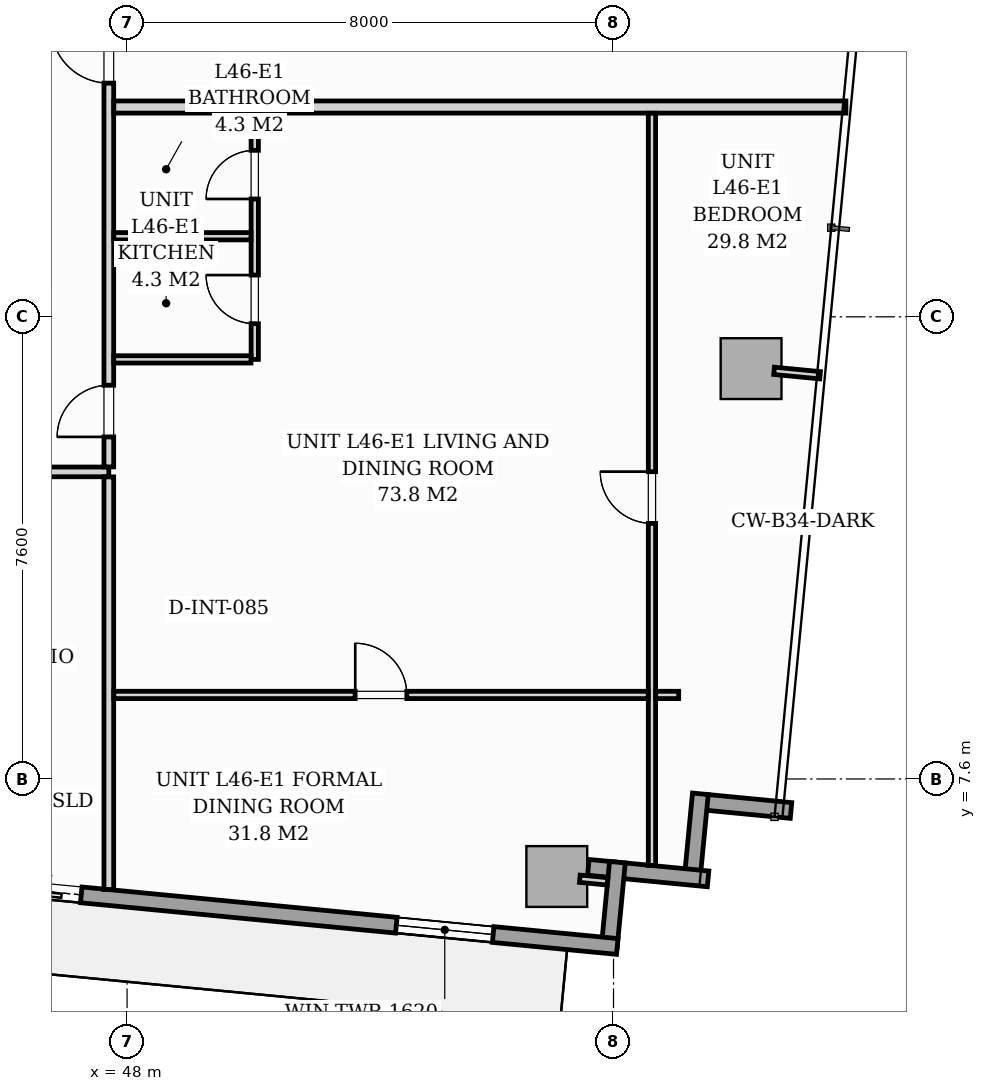
"""IFC4 building model, lengths in metres.
Left out: names, types, materials, properties, quantities, classifications, styles, units other than length and angle.
Written with IfcOpenShell. Run it as: python <this file> out.ifc"""

import sys

from ifc_helpers import new_model, si_unit, direction, frame, frame_2d, origin, origin_2d, place, context, subcontext, project, spatial, rectangle, extrude, source, transform, mapped, element, fill, save


model = new_model("IFC4")
c1 = context("Model", 3, precision=1e-05, world=origin(), true_north=direction((0.0, 1.0)))
c2 = subcontext(c1, "Body", "Model", "MODEL_VIEW")
j1 = project(units=[si_unit("LENGTHUNIT", "METRE"), si_unit("PLANEANGLEUNIT", "RADIAN")], contexts=[c1])
p1 = place(None, origin())
s1 = spatial("IfcSite", under=j1, at=p1, CompositionType="ELEMENT")
p2 = place(p1, origin())
s2 = spatial("IfcBuilding", under=s1, at=p2, CompositionType="ELEMENT")
p3 = place(p2, frame((0.0, 0.0, 159.8)))
s3 = spatial("IfcBuildingStorey", under=s2, at=p3, CompositionType="ELEMENT", Elevation=159.8)
m1 = source(origin(), c2, "Body", "SweptSolid", [
    extrude(rectangle(XDim=1.0, YDim=1.0, at=origin_2d()), origin(), (0.0, 0.0, 1.0), 3.194),
])
for number, where, z_axis, x_axis in (
    (1, (55.067, 5.996, 0.002), (0.0, 0.0, 1.0), (0.995, -0.096, 0.0)),
    (2, (58.262, 14.348, 0.002), (0.0, 0.0, 1.0), (0.995, -0.096, 0.0)),
):
    element("IfcColumn", number, at=place(p3, frame(where, z_axis=z_axis, x_axis=x_axis)), inside=s3, PredefinedType="COLUMN", context=c2, shape_type="MappedRepresentation", body=[
        mapped(m1, transform((0.0, 0.0, 0.0), scale=1.0)),
    ])
for number, where, z_axis, x_axis in (
    (3, (58.919, 7.082, 0.0), (0.0, 0.0, 1.0), (-0.995, 0.096, 0.0)),
    (4, (57.428, 7.356, 0.0), (0.0, 0.0, 1.0), (-0.096, -0.995, 0.0)),
):
    element("IfcWall", number, at=place(p3, frame(where, z_axis=z_axis, x_axis=x_axis)), inside=s3, PredefinedType="STANDARD", context=c2, shape_type="SweptSolid", body=[
        extrude(rectangle(XDim=1.395, YDim=0.26, at=frame_2d((0.697, 0.0))), origin(), (0.0, 0.0, 1.0), 2.9),
    ])
p4 = place(p3, frame((57.555, 5.958, 0.0), z_axis=(0.0, 0.0, 1.0), x_axis=(-0.995401789159, 0.095787672171, 0.0)))
e5 = element("IfcWall", 5, at=p4, inside=s3, PredefinedType="STANDARD", context=c2, shape_type="SweptSolid", body=[
    extrude(rectangle(XDim=1.978, YDim=0.26, at=frame_2d((0.989, 0.0))), origin(), (0.0, 0.0, 1.0), 2.9),
])
p5 = place(p3, frame((56.064, 6.232, 0.0), z_axis=(0.0, 0.0, 1.0), x_axis=(-0.09589913835, -0.995391056452, 0.0)))
e6 = element("IfcWall", 6, at=p5, inside=s3, PredefinedType="STANDARD", context=c2, shape_type="SweptSolid", body=[
    extrude(rectangle(XDim=1.395, YDim=0.26, at=frame_2d((0.698, 0.0))), origin(), (0.0, 0.0, 1.0), 2.9),
])
p6 = place(p3, frame((56.061, 4.845, 0.0), z_axis=(0.0, 0.0, 1.0), x_axis=(-0.995395976631, 0.095848055311, 0.0)))
e7 = element("IfcWall", 7, at=p6, inside=s3, PredefinedType="STANDARD", context=c2, shape_type="SweptSolid", body=[
    extrude(rectangle(XDim=17.01, YDim=0.26, at=frame_2d((8.505, 0.0))), origin(), (0.0, 0.0, 1.0), 2.9),
])
p7 = place(p6, frame((8.856, 0.0, 0.0)))
e8 = element("IfcOpeningElement", 8, at=p7, cuts=e7, PredefinedType="OPENING", context=c2, shape_type="SweptSolid", body=[
    extrude(rectangle(XDim=1.8, YDim=2.06, at=frame_2d((0.9, 1.03))), frame((0.0, 0.14, 0.0), z_axis=(0.0, -1.0, 0.0), x_axis=(1.0, 0.0, 0.0)), (0.0, 0.0, 1.0), 0.28),
])
p8 = place(p6, frame((2.05, 0.0, 0.65)))
e9 = element("IfcOpeningElement", 9, at=p8, cuts=e7, PredefinedType="OPENING", context=c2, shape_type="SweptSolid", body=[
    extrude(rectangle(XDim=1.6, YDim=1.5, at=frame_2d((0.8, 0.75))), frame((0.0, 0.14, 0.0), z_axis=(0.0, -1.0, 0.0), x_axis=(1.0, 0.0, 0.0)), (0.0, 0.0, 1.0), 0.28),
])
p9 = place(p3, frame((22.05, 12.65, 0.0), z_axis=(0.0, 0.0, 1.0), x_axis=(1.0, 0.0, 0.0)))
e10 = element("IfcWall", 10, at=p9, inside=s3, PredefinedType="PARTITIONING", context=c2, shape_type="SweptSolid", body=[
    extrude(rectangle(XDim=25.65, YDim=0.16, at=frame_2d((12.825, 0.0))), origin(), (0.0, 0.0, 1.0), 2.9),
])
p10 = place(p9, frame((1.736, 0.0, 0.0)))
e11 = element("IfcOpeningElement", 11, at=p10, cuts=e10, PredefinedType="OPENING", context=c2, shape_type="SweptSolid", body=[
    extrude(rectangle(XDim=0.95, YDim=2.06, at=frame_2d((0.475, 1.03))), frame((0.0, 0.09, 0.0), z_axis=(0.0, -1.0, 0.0), x_axis=(1.0, 0.0, 0.0)), (0.0, 0.0, 1.0), 0.18),
])
p11 = place(p9, frame((10.3, 0.0, 0.0)))
e12 = element("IfcOpeningElement", 12, at=p11, cuts=e10, PredefinedType="OPENING", context=c2, shape_type="SweptSolid", body=[
    extrude(rectangle(XDim=0.95, YDim=2.06, at=frame_2d((0.475, 1.03))), frame((0.0, 0.09, 0.0), z_axis=(0.0, -1.0, 0.0), x_axis=(1.0, 0.0, 0.0)), (0.0, 0.0, 1.0), 0.18),
])
p12 = place(p9, frame((22.965, 0.0, 0.0)))
e13 = element("IfcOpeningElement", 13, at=p12, cuts=e10, PredefinedType="OPENING", context=c2, shape_type="SweptSolid", body=[
    extrude(rectangle(XDim=0.95, YDim=2.06, at=frame_2d((0.475, 1.03))), frame((0.0, 0.09, 0.0), z_axis=(0.0, -1.0, 0.0), x_axis=(1.0, 0.0, 0.0)), (0.0, 0.0, 1.0), 0.18),
])
p13 = place(p3, frame((47.7, 5.783, 0.0), z_axis=(0.0, 0.0, 1.0), x_axis=(0.0, 1.0, 0.0)))
e14 = element("IfcWall", 14, at=p13, inside=s3, PredefinedType="PARTITIONING", context=c2, shape_type="SweptSolid", body=[
    extrude(rectangle(XDim=6.785, YDim=0.16, at=frame_2d((3.393, 0.0))), origin(), (0.0, 0.0, 1.0), 2.9),
])
p14 = place(p3, frame((47.7, 12.732, 0.0), z_axis=(0.0, 0.0, 1.0), x_axis=(0.0, 1.0, 0.0)))
e15 = element("IfcWall", 15, at=p14, inside=s3, PredefinedType="PARTITIONING", context=c2, shape_type="SweptSolid", body=[
    extrude(rectangle(XDim=7.918, YDim=0.16, at=frame_2d((3.959, 0.0))), origin(), (0.0, 0.0, 1.0), 2.9),
])
p15 = place(p14, frame((0.493, 0.0, 0.0)))
e16 = element("IfcOpeningElement", 16, at=p15, cuts=e15, PredefinedType="OPENING", context=c2, shape_type="SweptSolid", body=[
    extrude(rectangle(XDim=0.85, YDim=2.0, at=frame_2d((0.425, 1.0))), frame((0.0, 0.09, 0.0), z_axis=(0.0, -1.0, 0.0), x_axis=(1.0, 0.0, 0.0)), (0.0, 0.0, 1.0), 0.18),
])
p16 = place(p14, frame((6.311, 0.0, 0.0)))
e17 = element("IfcOpeningElement", 17, at=p16, cuts=e15, PredefinedType="OPENING", context=c2, shape_type="SweptSolid", body=[
    extrude(rectangle(XDim=0.95, YDim=2.06, at=frame_2d((0.475, 1.03))), frame((0.0, 0.09, 0.0), z_axis=(0.0, -1.0, 0.0), x_axis=(1.0, 0.0, 0.0)), (0.0, 0.0, 1.0), 0.18),
])
p17 = place(p3, frame((47.782, 18.65, 0.0), z_axis=(0.0, 0.0, 1.0), x_axis=(1.0, 0.0, 0.0)))
e18 = element("IfcWall", 18, at=p17, inside=s3, PredefinedType="PARTITIONING", context=c2, shape_type="SweptSolid", body=[
    extrude(rectangle(XDim=12.04, YDim=0.2, at=frame_2d((6.02, 0.0))), origin(), (0.0, 0.0, 1.0), 2.9),
])
p18 = place(p3, frame((50.1, 14.5, 0.0), z_axis=(0.0, 0.0, 1.0), x_axis=(0.0, 1.0, 0.0)))
e19 = element("IfcWall", 19, at=p18, inside=s3, PredefinedType="PARTITIONING", context=c2, shape_type="SweptSolid", body=[
    extrude(rectangle(XDim=4.048, YDim=0.12, at=frame_2d((2.024, 0.0))), origin(), (0.0, 0.0, 1.0), 2.9),
])
p19 = place(p18, frame((0.587, 0.0, 0.0)))
e20 = element("IfcOpeningElement", 20, at=p19, cuts=e19, PredefinedType="OPENING", context=c2, shape_type="SweptSolid", body=[
    extrude(rectangle(XDim=0.8, YDim=2.0, at=frame_2d((0.4, 1.0))), frame((0.0, 0.07, 0.0), z_axis=(0.0, -1.0, 0.0), x_axis=(1.0, 0.0, 0.0)), (0.0, 0.0, 1.0), 0.14),
])
p20 = place(p18, frame((2.638, 0.0, 0.0)))
e21 = element("IfcOpeningElement", 21, at=p20, cuts=e19, PredefinedType="OPENING", context=c2, shape_type="SweptSolid", body=[
    extrude(rectangle(XDim=0.8, YDim=2.02, at=frame_2d((0.4, 1.01))), frame((0.0, 0.07, 0.0), z_axis=(0.0, -1.0, 0.0), x_axis=(1.0, 0.0, 0.0)), (0.0, 0.0, 1.0), 0.14),
])
p21 = place(p3, frame((47.782, 16.525, 0.0), z_axis=(0.0, 0.0, 1.0), x_axis=(1.0, 0.0, 0.0)))
e22 = element("IfcWall", 22, at=p21, inside=s3, PredefinedType="PARTITIONING", context=c2, shape_type="SweptSolid", body=[
    extrude(rectangle(XDim=2.256, YDim=0.12, at=frame_2d((1.128, 0.0))), origin(), (0.0, 0.0, 1.0), 2.023),
])
p22 = place(p3, frame((47.782, 14.5, 0.0), z_axis=(0.0, 0.0, 1.0), x_axis=(1.0, 0.0, 0.0)))
e23 = element("IfcWall", 23, at=p22, inside=s3, PredefinedType="PARTITIONING", context=c2, shape_type="SweptSolid", body=[
    extrude(rectangle(XDim=2.256, YDim=0.12, at=frame_2d((1.128, 0.0))), origin(), (0.0, 0.0, 1.0), 2.9),
])
p23 = place(p3, frame((56.632, 6.179, 0.0), z_axis=(0.0, 0.0, 1.0), x_axis=(0.0, 1.0, 0.0)))
e24 = element("IfcWall", 24, at=p23, inside=s3, PredefinedType="PARTITIONING", context=c2, shape_type="SweptSolid", body=[
    extrude(rectangle(XDim=12.369, YDim=0.12, at=frame_2d((6.185, 0.0))), origin(), (0.0, 0.0, 1.0), 2.9),
])
p24 = place(p23, frame((5.624, 0.0, 0.0)))
e25 = element("IfcOpeningElement", 25, at=p24, cuts=e24, PredefinedType="OPENING", context=c2, shape_type="SweptSolid", body=[
    extrude(rectangle(XDim=0.85, YDim=2.05, at=frame_2d((0.425, 1.025))), frame((0.0, 0.07, 0.0), z_axis=(0.0, -1.0, 0.0), x_axis=(1.0, 0.0, 0.0)), (0.0, 0.0, 1.0), 0.14),
])
p25 = place(p3, frame((47.782, 8.982, 0.0), z_axis=(0.0, 0.0, 1.0), x_axis=(1.0, 0.0, 0.0)))
e26 = element("IfcWall", 26, at=p25, inside=s3, PredefinedType="PARTITIONING", context=c2, shape_type="SweptSolid", body=[
    extrude(rectangle(XDim=8.788, YDim=0.12, at=frame_2d((4.394, 0.0))), origin(), (0.0, 0.0, 1.0), 2.9),
])
p26 = place(p25, frame((3.969, 0.0, 0.0)))
e27 = element("IfcOpeningElement", 27, at=p26, cuts=e26, PredefinedType="OPENING", context=c2, shape_type="SweptSolid", body=[
    extrude(rectangle(XDim=0.85, YDim=2.05, at=frame_2d((0.425, 1.025))), frame((0.0, 0.07, 0.0), z_axis=(0.0, -1.0, 0.0), x_axis=(1.0, 0.0, 0.0)), (0.0, 0.0, 1.0), 0.14),
])
p27 = place(p3, frame((56.694, 8.982, 0.0), z_axis=(0.0, 0.0, 1.0), x_axis=(1.0, 0.0, 0.0)))
e28 = element("IfcWall", 28, at=p27, inside=s3, PredefinedType="PARTITIONING", context=c2, shape_type="SweptSolid", body=[
    extrude(rectangle(XDim=0.378, YDim=0.12, at=frame_2d((0.189, 0.0))), origin(), (0.0, 0.0, 1.0), 2.9),
])
p28 = place(p3, frame((55.445, 5.96, 0.0), z_axis=(0.0, 0.0, 1.0), x_axis=(0.995384576284, -0.09596637586, 0.0)))
e29 = element("IfcWall", 29, at=p28, inside=s3, PredefinedType="PARTITIONING", context=c2, shape_type="SweptSolid", body=[
    extrude(rectangle(XDim=0.458, YDim=0.12, at=frame_2d((0.229, 0.0))), origin(), (0.0, 0.0, 1.0), 2.9),
])
p29 = place(p3, frame((58.64, 14.312, 0.0), z_axis=(0.0, 0.0, 1.0), x_axis=(0.995377786728, -0.096036772582, 0.0)))
e30 = element("IfcWall", 30, at=p29, inside=s3, PredefinedType="PARTITIONING", context=c2, shape_type="SweptSolid", body=[
    extrude(rectangle(XDim=0.76, YDim=0.12, at=frame_2d((0.38, 0.0))), origin(), (0.0, 0.0, 1.0), 2.9),
])
m2 = source(origin(), c2, "Body", "SweptSolid", [
    extrude(rectangle(XDim=1.8, YDim=2.06, at=frame_2d((0.9, 1.03))), frame((0.0, 0.025, 0.0), z_axis=(0.0, -1.0, 0.0), x_axis=(1.0, 0.0, 0.0)), (0.0, 0.0, 1.0), 0.05),
])
p30 = place(p7, origin())
e31 = element("IfcDoor", 31, at=p30, inside=s3, OperationType="SLIDING_TO_RIGHT", PredefinedType="DOOR", context=c2, shape_type="MappedRepresentation", body=[
    mapped(m2, transform((0.0, 0.0, 0.0), scale=1.0)),
])
fill(e8, e31)
m3 = source(origin(), c2, "Body", "SweptSolid", [
    extrude(rectangle(XDim=1.6, YDim=1.5, at=frame_2d((0.8, 0.75))), frame((0.0, 0.03, 0.0), z_axis=(0.0, -1.0, 0.0), x_axis=(1.0, 0.0, 0.0)), (0.0, 0.0, 1.0), 0.06),
])
p31 = place(p8, origin())
e32 = element("IfcWindow", 32, at=p31, inside=s3, PartitioningType="SINGLE_PANEL", PredefinedType="WINDOW", context=c2, shape_type="MappedRepresentation", body=[
    mapped(m3, transform((0.0, 0.0, 0.0), scale=1.0)),
])
fill(e9, e32)
m4 = source(origin(), c2, "Body", "SweptSolid", [
    extrude(rectangle(XDim=0.85, YDim=2.0, at=frame_2d((0.425, 1.0))), frame((0.0, 0.025, 0.0), z_axis=(0.0, -1.0, 0.0), x_axis=(1.0, 0.0, 0.0)), (0.0, 0.0, 1.0), 0.05),
])
p32 = place(p15, origin())
e33 = element("IfcDoor", 33, at=p32, inside=s3, OperationType="SINGLE_SWING_LEFT", PredefinedType="DOOR", context=c2, shape_type="MappedRepresentation", body=[
    mapped(m4, transform((0.0, 0.0, 0.0), scale=1.0)),
])
fill(e16, e33)
m5 = source(origin(), c2, "Body", "SweptSolid", [
    extrude(rectangle(XDim=0.8, YDim=2.0, at=frame_2d((0.4, 1.0))), frame((0.0, 0.025, 0.0), z_axis=(0.0, -1.0, 0.0), x_axis=(1.0, 0.0, 0.0)), (0.0, 0.0, 1.0), 0.05),
])
p33 = place(p19, origin())
e34 = element("IfcDoor", 34, at=p33, inside=s3, OperationType="SINGLE_SWING_RIGHT", PredefinedType="DOOR", context=c2, shape_type="MappedRepresentation", body=[
    mapped(m5, transform((0.0, 0.0, 0.0), scale=1.0)),
])
fill(e20, e34)
m6 = source(origin(), c2, "Body", "SweptSolid", [
    extrude(rectangle(XDim=0.8, YDim=2.02, at=frame_2d((0.4, 1.01))), frame((0.0, 0.025, 0.0), z_axis=(0.0, -1.0, 0.0), x_axis=(1.0, 0.0, 0.0)), (0.0, 0.0, 1.0), 0.05),
])
p34 = place(p20, origin())
e35 = element("IfcDoor", 35, at=p34, inside=s3, OperationType="SINGLE_SWING_LEFT", PredefinedType="DOOR", context=c2, shape_type="MappedRepresentation", body=[
    mapped(m6, transform((0.0, 0.0, 0.0), scale=1.0)),
])
fill(e21, e35)
m7 = source(origin(), c2, "Body", "SweptSolid", [
    extrude(rectangle(XDim=0.85, YDim=2.05, at=frame_2d((0.425, 1.025))), frame((0.0, 0.025, 0.0), z_axis=(0.0, -1.0, 0.0), x_axis=(1.0, 0.0, 0.0)), (0.0, 0.0, 1.0), 0.05),
])
p35 = place(p24, origin())
e36 = element("IfcDoor", 36, at=p35, inside=s3, OperationType="SINGLE_SWING_RIGHT", PredefinedType="DOOR", context=c2, shape_type="MappedRepresentation", body=[
    mapped(m7, transform((0.0, 0.0, 0.0), scale=1.0)),
])
fill(e25, e36)
p36 = place(p26, origin())
e37 = element("IfcDoor", 37, at=p36, inside=s3, OperationType="SINGLE_SWING_LEFT", PredefinedType="DOOR", context=c2, shape_type="MappedRepresentation", body=[
    mapped(m7, transform((0.0, 0.0, 0.0), scale=1.0)),
])
fill(e27, e37)
m8 = source(origin(), c2, "Body", "SweptSolid", [
    extrude(rectangle(XDim=0.95, YDim=2.06, at=frame_2d((0.475, 1.03))), frame((0.0, 0.025, 0.0), z_axis=(0.0, -1.0, 0.0), x_axis=(1.0, 0.0, 0.0)), (0.0, 0.0, 1.0), 0.05),
])
p37 = place(p16, origin())
e38 = element("IfcDoor", 38, at=p37, inside=s3, OperationType="SINGLE_SWING_RIGHT", PredefinedType="DOOR", context=c2, shape_type="MappedRepresentation", body=[
    mapped(m8, transform((0.0, 0.0, 0.0), scale=1.0)),
])
fill(e17, e38)
save(model, sys.argv[1])
